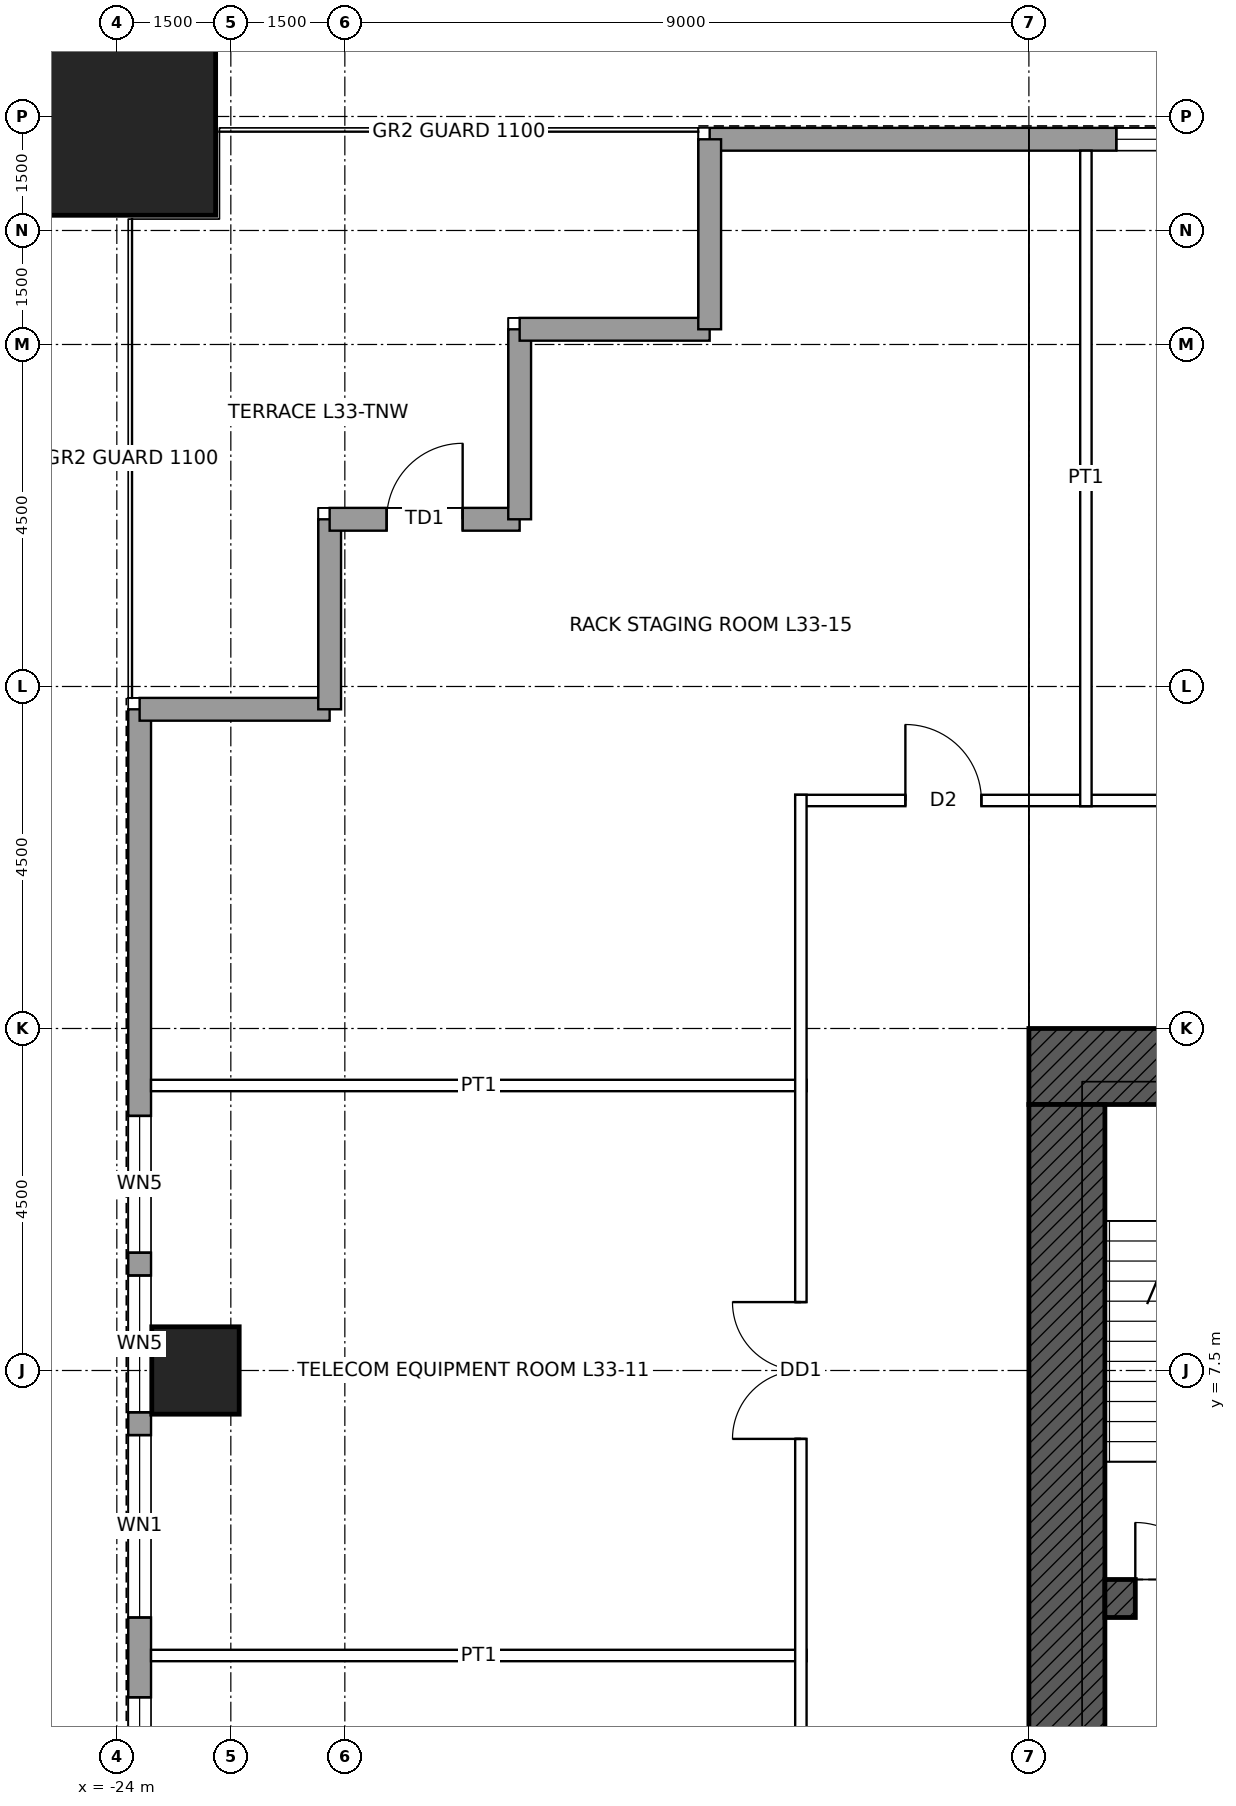
"""IFC4 building model, lengths in metres.
Left out: names, types, materials, properties, quantities, classifications, styles, units other than length and angle.
Written with IfcOpenShell. Run it as: python <this file> out.ifc"""

import sys

from ifc_helpers import new_model, si_unit, direction, frame, frame_2d, origin, origin_2d, place, context, subcontext, project, spatial, rectangle, hollow_rectangle, extrude, element, fill, save


model = new_model("IFC4")
c1 = context("Model", 3, precision=1e-05, world=origin(), true_north=direction((0.0, 1.0)))
c2 = subcontext(c1, "Body", "Model", "MODEL_VIEW")
j1 = project(units=[si_unit("LENGTHUNIT", "METRE"), si_unit("PLANEANGLEUNIT", "RADIAN")], contexts=[c1])
p1 = place(None, origin())
s1 = spatial("IfcSite", under=j1, at=p1, CompositionType="ELEMENT")
p2 = place(p1, origin())
s2 = spatial("IfcBuilding", under=s1, at=p2, CompositionType="ELEMENT")
p3 = place(p2, frame((0.0, 0.0, 162.9)))
s3 = spatial("IfcBuildingStorey", under=s2, at=p3, CompositionType="ELEMENT", Elevation=162.9)
p4 = place(p3, frame((-24.0, 24.0, 0.0), z_axis=(0.0, 0.0, 1.0), x_axis=(1.0, 0.0, 0.0)))
e1 = element("IfcColumn", 1, at=p4, inside=s3, PredefinedType="COLUMN", context=c2, shape_type="SweptSolid", body=[
    extrude(hollow_rectangle(XDim=2.6, YDim=2.6, WallThickness=0.13, at=origin_2d()), origin(), (0.0, 0.0, 1.0), 4.5),
])
p5 = place(p3, frame((-22.965, 7.5, 0.0), z_axis=(0.0, 0.0, 1.0), x_axis=(1.0, 0.0, 0.0)))
e2 = element("IfcColumn", 2, at=p5, inside=s3, PredefinedType="COLUMN", context=c2, shape_type="SweptSolid", body=[
    extrude(hollow_rectangle(XDim=1.15, YDim=1.15, WallThickness=0.075, at=origin_2d()), origin(), (0.0, 0.0, 1.0), 4.5),
])
p6 = place(p3, frame((-12.0, 11.5, 0.0), z_axis=(0.0, 0.0, 1.0), x_axis=(1.0, 0.0, 0.0)))
e3 = element("IfcWall", 3, at=p6, inside=s3, PredefinedType="SHEAR", context=c2, shape_type="SweptSolid", body=[
    extrude(rectangle(XDim=24.0, YDim=1.0, at=frame_2d((12.0, 0.0))), origin(), (0.0, 0.0, 1.0), 4.5),
])
p7 = place(p6, frame((6.25, 0.0, 0.0)))
e4 = element("IfcOpeningElement", 4, at=p7, cuts=e3, PredefinedType="OPENING", context=c2, shape_type="SweptSolid", body=[
    extrude(rectangle(XDim=1.0, YDim=2.4, at=frame_2d((0.5, 1.2))), frame((0.0, 0.51, 0.0), z_axis=(0.0, -1.0, 0.0), x_axis=(1.0, 0.0, 0.0)), (0.0, 0.0, 1.0), 1.02),
])
p8 = place(p6, frame((16.75, 0.0, 0.0)))
e5 = element("IfcOpeningElement", 5, at=p8, cuts=e3, PredefinedType="OPENING", context=c2, shape_type="SweptSolid", body=[
    extrude(rectangle(XDim=1.0, YDim=2.4, at=frame_2d((0.5, 1.2))), frame((0.0, 0.51, 0.0), z_axis=(0.0, -1.0, 0.0), x_axis=(1.0, 0.0, 0.0)), (0.0, 0.0, 1.0), 1.02),
])
p9 = place(p3, frame((-11.5, -11.0, 0.0), z_axis=(0.0, 0.0, 1.0), x_axis=(0.0, 1.0, 0.0)))
e6 = element("IfcWall", 6, at=p9, inside=s3, PredefinedType="SHEAR", context=c2, shape_type="SweptSolid", body=[
    extrude(rectangle(XDim=22.0, YDim=1.0, at=frame_2d((11.0, 0.0))), origin(), (0.0, 0.0, 1.0), 4.5),
])
p10 = place(p9, frame((10.5, 0.0, 0.0)))
e7 = element("IfcOpeningElement", 7, at=p10, cuts=e6, PredefinedType="OPENING", context=c2, shape_type="SweptSolid", body=[
    extrude(rectangle(XDim=1.0, YDim=2.4, at=frame_2d((0.5, 1.2))), frame((0.0, 0.51, 0.0), z_axis=(0.0, -1.0, 0.0), x_axis=(1.0, 0.0, 0.0)), (0.0, 0.0, 1.0), 1.02),
])
p11 = place(p3, frame((-11.0, 4.5, 0.0), z_axis=(0.0, 0.0, 1.0), x_axis=(1.0, 0.0, 0.0)))
e8 = element("IfcWall", 8, at=p11, inside=s3, PredefinedType="SHEAR", context=c2, shape_type="SweptSolid", body=[
    extrude(rectangle(XDim=22.0, YDim=0.5, at=frame_2d((11.0, 0.0))), origin(), (0.0, 0.0, 1.0), 4.5),
])
p12 = place(p11, frame((0.4, 0.0, 0.0)))
e9 = element("IfcOpeningElement", 9, at=p12, cuts=e8, PredefinedType="OPENING", context=c2, shape_type="SweptSolid", body=[
    extrude(rectangle(XDim=1.0, YDim=2.1, at=frame_2d((0.5, 1.05))), frame((0.0, 0.26, 0.0), z_axis=(0.0, -1.0, 0.0), x_axis=(1.0, 0.0, 0.0)), (0.0, 0.0, 1.0), 0.52),
])
p13 = place(p11, frame((20.6, 0.0, 0.0)))
e10 = element("IfcOpeningElement", 10, at=p13, cuts=e8, PredefinedType="OPENING", context=c2, shape_type="SweptSolid", body=[
    extrude(rectangle(XDim=1.0, YDim=2.1, at=frame_2d((0.5, 1.05))), frame((0.0, 0.26, 0.0), z_axis=(0.0, -1.0, 0.0), x_axis=(1.0, 0.0, 0.0)), (0.0, 0.0, 1.0), 0.52),
])
p14 = place(p3, frame((-16.2, 23.7, 0.0), z_axis=(0.0, 0.0, 1.0), x_axis=(1.0, 0.0, 0.0)))
e11 = element("IfcWall", 11, at=p14, inside=s3, PredefinedType="SOLIDWALL", context=c2, shape_type="SweptSolid", body=[
    extrude(rectangle(XDim=32.4, YDim=0.3, at=frame_2d((16.2, 0.0))), origin(), (0.0, 0.0, 1.0), 4.3),
])
p15 = place(p14, frame((5.35, 0.0, 1.0)))
e12 = element("IfcOpeningElement", 12, at=p15, cuts=e11, PredefinedType="OPENING", context=c2, shape_type="SweptSolid", body=[
    extrude(rectangle(XDim=1.8, YDim=1.2, at=frame_2d((0.9, 0.6))), frame((0.0, 0.16, 0.0), z_axis=(0.0, -1.0, 0.0), x_axis=(1.0, 0.0, 0.0)), (0.0, 0.0, 1.0), 0.32),
])
p16 = place(p14, frame((7.45, 0.0, 1.0)))
e13 = element("IfcOpeningElement", 13, at=p16, cuts=e11, PredefinedType="OPENING", context=c2, shape_type="SweptSolid", body=[
    extrude(rectangle(XDim=2.4, YDim=1.2, at=frame_2d((1.2, 0.6))), frame((0.0, 0.16, 0.0), z_axis=(0.0, -1.0, 0.0), x_axis=(1.0, 0.0, 0.0)), (0.0, 0.0, 1.0), 0.32),
])
p17 = place(p14, frame((10.15, 0.0, 1.0)))
e14 = element("IfcOpeningElement", 14, at=p17, cuts=e11, PredefinedType="OPENING", context=c2, shape_type="SweptSolid", body=[
    extrude(rectangle(XDim=2.4, YDim=1.2, at=frame_2d((1.2, 0.6))), frame((0.0, 0.16, 0.0), z_axis=(0.0, -1.0, 0.0), x_axis=(1.0, 0.0, 0.0)), (0.0, 0.0, 1.0), 0.32),
])
p18 = place(p14, frame((13.0, 0.0, 1.0)))
e15 = element("IfcOpeningElement", 15, at=p18, cuts=e11, PredefinedType="OPENING", context=c2, shape_type="SweptSolid", body=[
    extrude(rectangle(XDim=2.4, YDim=1.2, at=frame_2d((1.2, 0.6))), frame((0.0, 0.16, 0.0), z_axis=(0.0, -1.0, 0.0), x_axis=(1.0, 0.0, 0.0)), (0.0, 0.0, 1.0), 0.32),
])
p19 = place(p14, frame((17.0, 0.0, 1.0)))
e16 = element("IfcOpeningElement", 16, at=p19, cuts=e11, PredefinedType="OPENING", context=c2, shape_type="SweptSolid", body=[
    extrude(rectangle(XDim=2.4, YDim=1.2, at=frame_2d((1.2, 0.6))), frame((0.0, 0.16, 0.0), z_axis=(0.0, -1.0, 0.0), x_axis=(1.0, 0.0, 0.0)), (0.0, 0.0, 1.0), 0.32),
])
p20 = place(p14, frame((19.85, 0.0, 1.0)))
e17 = element("IfcOpeningElement", 17, at=p20, cuts=e11, PredefinedType="OPENING", context=c2, shape_type="SweptSolid", body=[
    extrude(rectangle(XDim=2.4, YDim=1.2, at=frame_2d((1.2, 0.6))), frame((0.0, 0.16, 0.0), z_axis=(0.0, -1.0, 0.0), x_axis=(1.0, 0.0, 0.0)), (0.0, 0.0, 1.0), 0.32),
])
p21 = place(p14, frame((22.55, 0.0, 1.0)))
e18 = element("IfcOpeningElement", 18, at=p21, cuts=e11, PredefinedType="OPENING", context=c2, shape_type="SweptSolid", body=[
    extrude(rectangle(XDim=2.4, YDim=1.2, at=frame_2d((1.2, 0.6))), frame((0.0, 0.16, 0.0), z_axis=(0.0, -1.0, 0.0), x_axis=(1.0, 0.0, 0.0)), (0.0, 0.0, 1.0), 0.32),
])
p22 = place(p14, frame((25.25, 0.0, 1.0)))
e19 = element("IfcOpeningElement", 19, at=p22, cuts=e11, PredefinedType="OPENING", context=c2, shape_type="SweptSolid", body=[
    extrude(rectangle(XDim=1.8, YDim=1.2, at=frame_2d((0.9, 0.6))), frame((0.0, 0.16, 0.0), z_axis=(0.0, -1.0, 0.0), x_axis=(1.0, 0.0, 0.0)), (0.0, 0.0, 1.0), 0.32),
])
p23 = place(p3, frame((-23.7, -16.2, 0.0), z_axis=(0.0, 0.0, 1.0), x_axis=(0.0, 1.0, 0.0)))
e20 = element("IfcWall", 20, at=p23, inside=s3, PredefinedType="SOLIDWALL", context=c2, shape_type="SweptSolid", body=[
    extrude(rectangle(XDim=32.4, YDim=0.3, at=frame_2d((16.2, 0.0))), origin(), (0.0, 0.0, 1.0), 4.3),
])
p24 = place(p23, frame((5.35, 0.0, 1.0)))
e21 = element("IfcOpeningElement", 21, at=p24, cuts=e20, PredefinedType="OPENING", context=c2, shape_type="SweptSolid", body=[
    extrude(rectangle(XDim=1.8, YDim=1.2, at=frame_2d((0.9, 0.6))), frame((0.0, 0.16, 0.0), z_axis=(0.0, -1.0, 0.0), x_axis=(1.0, 0.0, 0.0)), (0.0, 0.0, 1.0), 0.32),
])
p25 = place(p23, frame((7.45, 0.0, 1.0)))
e22 = element("IfcOpeningElement", 22, at=p25, cuts=e20, PredefinedType="OPENING", context=c2, shape_type="SweptSolid", body=[
    extrude(rectangle(XDim=1.8, YDim=1.2, at=frame_2d((0.9, 0.6))), frame((0.0, 0.16, 0.0), z_axis=(0.0, -1.0, 0.0), x_axis=(1.0, 0.0, 0.0)), (0.0, 0.0, 1.0), 0.32),
])
p26 = place(p23, frame((9.55, 0.0, 1.0)))
e23 = element("IfcOpeningElement", 23, at=p26, cuts=e20, PredefinedType="OPENING", context=c2, shape_type="SweptSolid", body=[
    extrude(rectangle(XDim=2.4, YDim=1.2, at=frame_2d((1.2, 0.6))), frame((0.0, 0.16, 0.0), z_axis=(0.0, -1.0, 0.0), x_axis=(1.0, 0.0, 0.0)), (0.0, 0.0, 1.0), 0.32),
])
p27 = place(p23, frame((13.0, 0.0, 1.0)))
e24 = element("IfcOpeningElement", 24, at=p27, cuts=e20, PredefinedType="OPENING", context=c2, shape_type="SweptSolid", body=[
    extrude(rectangle(XDim=2.4, YDim=1.2, at=frame_2d((1.2, 0.6))), frame((0.0, 0.16, 0.0), z_axis=(0.0, -1.0, 0.0), x_axis=(1.0, 0.0, 0.0)), (0.0, 0.0, 1.0), 0.32),
])
p28 = place(p23, frame((17.0, 0.0, 1.0)))
e25 = element("IfcOpeningElement", 25, at=p28, cuts=e20, PredefinedType="OPENING", context=c2, shape_type="SweptSolid", body=[
    extrude(rectangle(XDim=2.4, YDim=1.2, at=frame_2d((1.2, 0.6))), frame((0.0, 0.16, 0.0), z_axis=(0.0, -1.0, 0.0), x_axis=(1.0, 0.0, 0.0)), (0.0, 0.0, 1.0), 0.32),
])
p29 = place(p23, frame((20.45, 0.0, 1.0)))
e26 = element("IfcOpeningElement", 26, at=p29, cuts=e20, PredefinedType="OPENING", context=c2, shape_type="SweptSolid", body=[
    extrude(rectangle(XDim=2.4, YDim=1.2, at=frame_2d((1.2, 0.6))), frame((0.0, 0.16, 0.0), z_axis=(0.0, -1.0, 0.0), x_axis=(1.0, 0.0, 0.0)), (0.0, 0.0, 1.0), 0.32),
])
p30 = place(p23, frame((23.15, 0.0, 1.0)))
e27 = element("IfcOpeningElement", 27, at=p30, cuts=e20, PredefinedType="OPENING", context=c2, shape_type="SweptSolid", body=[
    extrude(rectangle(XDim=1.8, YDim=1.2, at=frame_2d((0.9, 0.6))), frame((0.0, 0.16, 0.0), z_axis=(0.0, -1.0, 0.0), x_axis=(1.0, 0.0, 0.0)), (0.0, 0.0, 1.0), 0.32),
])
p31 = place(p23, frame((25.25, 0.0, 1.0)))
e28 = element("IfcOpeningElement", 28, at=p31, cuts=e20, PredefinedType="OPENING", context=c2, shape_type="SweptSolid", body=[
    extrude(rectangle(XDim=1.8, YDim=1.2, at=frame_2d((0.9, 0.6))), frame((0.0, 0.16, 0.0), z_axis=(0.0, -1.0, 0.0), x_axis=(1.0, 0.0, 0.0)), (0.0, 0.0, 1.0), 0.32),
])
for number, where, z_axis, x_axis in (
    (29, (-23.7, 16.2, 0.0), (0.0, 0.0, 1.0), (1.0, 0.0, 0.0)),
    (30, (-21.2, 16.2, 0.0), (0.0, 0.0, 1.0), (0.0, 1.0, 0.0)),
):
    element("IfcWall", number, at=place(p3, frame(where, z_axis=z_axis, x_axis=x_axis)), inside=s3, PredefinedType="SOLIDWALL", context=c2, shape_type="SweptSolid", body=[
        extrude(rectangle(XDim=2.5, YDim=0.3, at=frame_2d((1.25, 0.0))), origin(), (0.0, 0.0, 1.0), 4.3),
    ])
p32 = place(p3, frame((-21.2, 18.7, 0.0), z_axis=(0.0, 0.0, 1.0), x_axis=(1.0, 0.0, 0.0)))
e31 = element("IfcWall", 31, at=p32, inside=s3, PredefinedType="SOLIDWALL", context=c2, shape_type="SweptSolid", body=[
    extrude(rectangle(XDim=2.5, YDim=0.3, at=frame_2d((1.25, 0.0))), origin(), (0.0, 0.0, 1.0), 4.3),
])
p33 = place(p32, frame((0.75, 0.0, 0.0)))
e32 = element("IfcOpeningElement", 32, at=p33, cuts=e31, PredefinedType="OPENING", context=c2, shape_type="SweptSolid", body=[
    extrude(rectangle(XDim=1.0, YDim=2.4, at=frame_2d((0.5, 1.2))), frame((0.0, 0.16, 0.0), z_axis=(0.0, -1.0, 0.0), x_axis=(1.0, 0.0, 0.0)), (0.0, 0.0, 1.0), 0.32),
])
for number, where, z_axis, x_axis in (
    (33, (-18.7, 18.7, 0.0), (0.0, 0.0, 1.0), (0.0, 1.0, 0.0)),
    (34, (-18.7, 21.2, 0.0), (0.0, 0.0, 1.0), (1.0, 0.0, 0.0)),
    (35, (-16.2, 21.2, 0.0), (0.0, 0.0, 1.0), (0.0, 1.0, 0.0)),
):
    element("IfcWall", number, at=place(p3, frame(where, z_axis=z_axis, x_axis=x_axis)), inside=s3, PredefinedType="SOLIDWALL", context=c2, shape_type="SweptSolid", body=[
        extrude(rectangle(XDim=2.5, YDim=0.3, at=frame_2d((1.25, 0.0))), origin(), (0.0, 0.0, 1.0), 4.3),
    ])
for number, where, z_axis, x_axis in (
    (36, (-23.55, 3.75, 0.0), (0.0, 0.0, 1.0), (1.0, 0.0, 0.0)),
    (37, (-23.55, 11.25, 0.0), (0.0, 0.0, 1.0), (1.0, 0.0, 0.0)),
):
    element("IfcWall", number, at=place(p3, frame(where, z_axis=z_axis, x_axis=x_axis)), inside=s3, PredefinedType="PARTITIONING", context=c2, shape_type="SweptSolid", body=[
        extrude(rectangle(XDim=8.625, YDim=0.15, at=frame_2d((4.312, 0.0))), origin(), (0.0, 0.0, 1.0), 3.431),
    ])
p34 = place(p3, frame((-15.075, 15.0, 0.0), z_axis=(0.0, 0.0, 1.0), x_axis=(1.0, 0.0, 0.0)))
e38 = element("IfcWall", 38, at=p34, inside=s3, PredefinedType="PARTITIONING", context=c2, shape_type="SweptSolid", body=[
    extrude(rectangle(XDim=30.15, YDim=0.15, at=frame_2d((15.075, 0.0))), origin(), (0.0, 0.0, 1.0), 4.3),
])
p35 = place(p34, frame((8.55, 0.0, 0.0)))
e39 = element("IfcOpeningElement", 39, at=p35, cuts=e38, PredefinedType="OPENING", context=c2, shape_type="SweptSolid", body=[
    extrude(rectangle(XDim=1.8, YDim=2.4, at=frame_2d((0.9, 1.2))), frame((0.0, 0.085, 0.0), z_axis=(0.0, -1.0, 0.0), x_axis=(1.0, 0.0, 0.0)), (0.0, 0.0, 1.0), 0.17),
])
p36 = place(p34, frame((19.8, 0.0, 0.0)))
e40 = element("IfcOpeningElement", 40, at=p36, cuts=e38, PredefinedType="OPENING", context=c2, shape_type="SweptSolid", body=[
    extrude(rectangle(XDim=1.8, YDim=2.4, at=frame_2d((0.9, 1.2))), frame((0.0, 0.085, 0.0), z_axis=(0.0, -1.0, 0.0), x_axis=(1.0, 0.0, 0.0)), (0.0, 0.0, 1.0), 0.17),
])
p37 = place(p34, frame((27.7, 0.0, 0.0)))
e41 = element("IfcOpeningElement", 41, at=p37, cuts=e38, PredefinedType="OPENING", context=c2, shape_type="SweptSolid", body=[
    extrude(rectangle(XDim=1.0, YDim=2.1, at=frame_2d((0.5, 1.05))), frame((0.0, 0.085, 0.0), z_axis=(0.0, -1.0, 0.0), x_axis=(1.0, 0.0, 0.0)), (0.0, 0.0, 1.0), 0.17),
])
p38 = place(p34, frame((1.45, 0.0, 0.0)))
e42 = element("IfcOpeningElement", 42, at=p38, cuts=e38, PredefinedType="OPENING", context=c2, shape_type="SweptSolid", body=[
    extrude(rectangle(XDim=1.0, YDim=2.1, at=frame_2d((0.5, 1.05))), frame((0.0, 0.085, 0.0), z_axis=(0.0, -1.0, 0.0), x_axis=(1.0, 0.0, 0.0)), (0.0, 0.0, 1.0), 0.17),
])
p39 = place(p3, frame((-15.0, -15.075, 0.0), z_axis=(0.0, 0.0, 1.0), x_axis=(0.0, 1.0, 0.0)))
e43 = element("IfcWall", 43, at=p39, inside=s3, PredefinedType="PARTITIONING", context=c2, shape_type="SweptSolid", body=[
    extrude(rectangle(XDim=30.15, YDim=0.15, at=frame_2d((15.075, 0.0))), origin(), (0.0, 0.0, 1.0), 4.3),
])
p40 = place(p39, frame((7.075, 0.0, 0.0)))
e44 = element("IfcOpeningElement", 44, at=p40, cuts=e43, PredefinedType="OPENING", context=c2, shape_type="SweptSolid", body=[
    extrude(rectangle(XDim=1.0, YDim=2.1, at=frame_2d((0.5, 1.05))), frame((0.0, 0.085, 0.0), z_axis=(0.0, -1.0, 0.0), x_axis=(1.0, 0.0, 0.0)), (0.0, 0.0, 1.0), 0.17),
])
p41 = place(p39, frame((14.575, 0.0, 0.0)))
e45 = element("IfcOpeningElement", 45, at=p41, cuts=e43, PredefinedType="OPENING", context=c2, shape_type="SweptSolid", body=[
    extrude(rectangle(XDim=1.0, YDim=2.1, at=frame_2d((0.5, 1.05))), frame((0.0, 0.085, 0.0), z_axis=(0.0, -1.0, 0.0), x_axis=(1.0, 0.0, 0.0)), (0.0, 0.0, 1.0), 0.17),
])
p42 = place(p39, frame((21.675, 0.0, 0.0)))
e46 = element("IfcOpeningElement", 46, at=p42, cuts=e43, PredefinedType="OPENING", context=c2, shape_type="SweptSolid", body=[
    extrude(rectangle(XDim=1.8, YDim=2.4, at=frame_2d((0.9, 1.2))), frame((0.0, 0.085, 0.0), z_axis=(0.0, -1.0, 0.0), x_axis=(1.0, 0.0, 0.0)), (0.0, 0.0, 1.0), 0.17),
])
p43 = place(p3, frame((-11.25, 14.925, 0.0), z_axis=(0.0, 0.0, 1.0), x_axis=(0.0, 1.0, 0.0)))
e47 = element("IfcWall", 47, at=p43, inside=s3, PredefinedType="PARTITIONING", context=c2, shape_type="SweptSolid", body=[
    extrude(rectangle(XDim=8.625, YDim=0.15, at=frame_2d((4.312, 0.0))), origin(), (0.0, 0.0, 1.0), 3.431),
])
p44 = place(p15, origin())
e48 = element("IfcWindow", 48, at=p44, inside=s3, PartitioningType="SINGLE_PANEL", PredefinedType="WINDOW", context=c2, shape_type="SweptSolid", body=[
    extrude(rectangle(XDim=1.8, YDim=1.2, at=frame_2d((0.9, 0.6))), frame((0.0, 0.03, 0.0), z_axis=(0.0, -1.0, 0.0), x_axis=(1.0, 0.0, 0.0)), (0.0, 0.0, 1.0), 0.06),
])
fill(e12, e48)
p45 = place(p28, origin())
e49 = element("IfcWindow", 49, at=p45, inside=s3, PartitioningType="SINGLE_PANEL", PredefinedType="WINDOW", context=c2, shape_type="SweptSolid", body=[
    extrude(rectangle(XDim=2.4, YDim=1.2, at=frame_2d((1.2, 0.6))), frame((0.0, 0.03, 0.0), z_axis=(0.0, -1.0, 0.0), x_axis=(1.0, 0.0, 0.0)), (0.0, 0.0, 1.0), 0.06),
])
fill(e25, e49)
p46 = place(p29, origin())
e50 = element("IfcWindow", 50, at=p46, inside=s3, PartitioningType="SINGLE_PANEL", PredefinedType="WINDOW", context=c2, shape_type="SweptSolid", body=[
    extrude(rectangle(XDim=2.4, YDim=1.2, at=frame_2d((1.2, 0.6))), frame((0.0, 0.03, 0.0), z_axis=(0.0, -1.0, 0.0), x_axis=(1.0, 0.0, 0.0)), (0.0, 0.0, 1.0), 0.06),
])
fill(e26, e50)
p47 = place(p30, origin())
e51 = element("IfcWindow", 51, at=p47, inside=s3, PartitioningType="SINGLE_PANEL", PredefinedType="WINDOW", context=c2, shape_type="SweptSolid", body=[
    extrude(rectangle(XDim=1.8, YDim=1.2, at=frame_2d((0.9, 0.6))), frame((0.0, 0.03, 0.0), z_axis=(0.0, -1.0, 0.0), x_axis=(1.0, 0.0, 0.0)), (0.0, 0.0, 1.0), 0.06),
])
fill(e27, e51)
p48 = place(p31, origin())
e52 = element("IfcWindow", 52, at=p48, inside=s3, PartitioningType="SINGLE_PANEL", PredefinedType="WINDOW", context=c2, shape_type="SweptSolid", body=[
    extrude(rectangle(XDim=1.8, YDim=1.2, at=frame_2d((0.9, 0.6))), frame((0.0, 0.03, 0.0), z_axis=(0.0, -1.0, 0.0), x_axis=(1.0, 0.0, 0.0)), (0.0, 0.0, 1.0), 0.06),
])
fill(e28, e52)
p49 = place(p33, origin())
e53 = element("IfcDoor", 53, at=p49, inside=s3, OperationType="SINGLE_SWING_RIGHT", PredefinedType="DOOR", context=c2, shape_type="SweptSolid", body=[
    extrude(rectangle(XDim=1.0, YDim=2.4, at=frame_2d((0.5, 1.2))), frame((0.0, 0.025, 0.0), z_axis=(0.0, -1.0, 0.0), x_axis=(1.0, 0.0, 0.0)), (0.0, 0.0, 1.0), 0.05),
])
fill(e32, e53)
p50 = place(p12, origin())
e54 = element("IfcDoor", 54, at=p50, inside=s3, OperationType="SINGLE_SWING_LEFT", PredefinedType="DOOR", context=c2, shape_type="SweptSolid", body=[
    extrude(rectangle(XDim=1.0, YDim=2.1, at=frame_2d((0.5, 1.05))), frame((0.0, 0.025, 0.0), z_axis=(0.0, -1.0, 0.0), x_axis=(1.0, 0.0, 0.0)), (0.0, 0.0, 1.0), 0.05),
])
fill(e9, e54)
p51 = place(p42, origin())
e55 = element("IfcDoor", 55, at=p51, inside=s3, OperationType="DOUBLE_DOOR_SINGLE_SWING", PredefinedType="DOOR", context=c2, shape_type="SweptSolid", body=[
    extrude(rectangle(XDim=1.8, YDim=2.4, at=frame_2d((0.9, 1.2))), frame((0.0, 0.025, 0.0), z_axis=(0.0, -1.0, 0.0), x_axis=(1.0, 0.0, 0.0)), (0.0, 0.0, 1.0), 0.05),
])
fill(e46, e55)
p52 = place(p38, origin())
e56 = element("IfcDoor", 56, at=p52, inside=s3, OperationType="SINGLE_SWING_LEFT", PredefinedType="DOOR", context=c2, shape_type="SweptSolid", body=[
    extrude(rectangle(XDim=1.0, YDim=2.1, at=frame_2d((0.5, 1.05))), frame((0.0, 0.025, 0.0), z_axis=(0.0, -1.0, 0.0), x_axis=(1.0, 0.0, 0.0)), (0.0, 0.0, 1.0), 0.05),
])
fill(e42, e56)
save(model, sys.argv[1])
